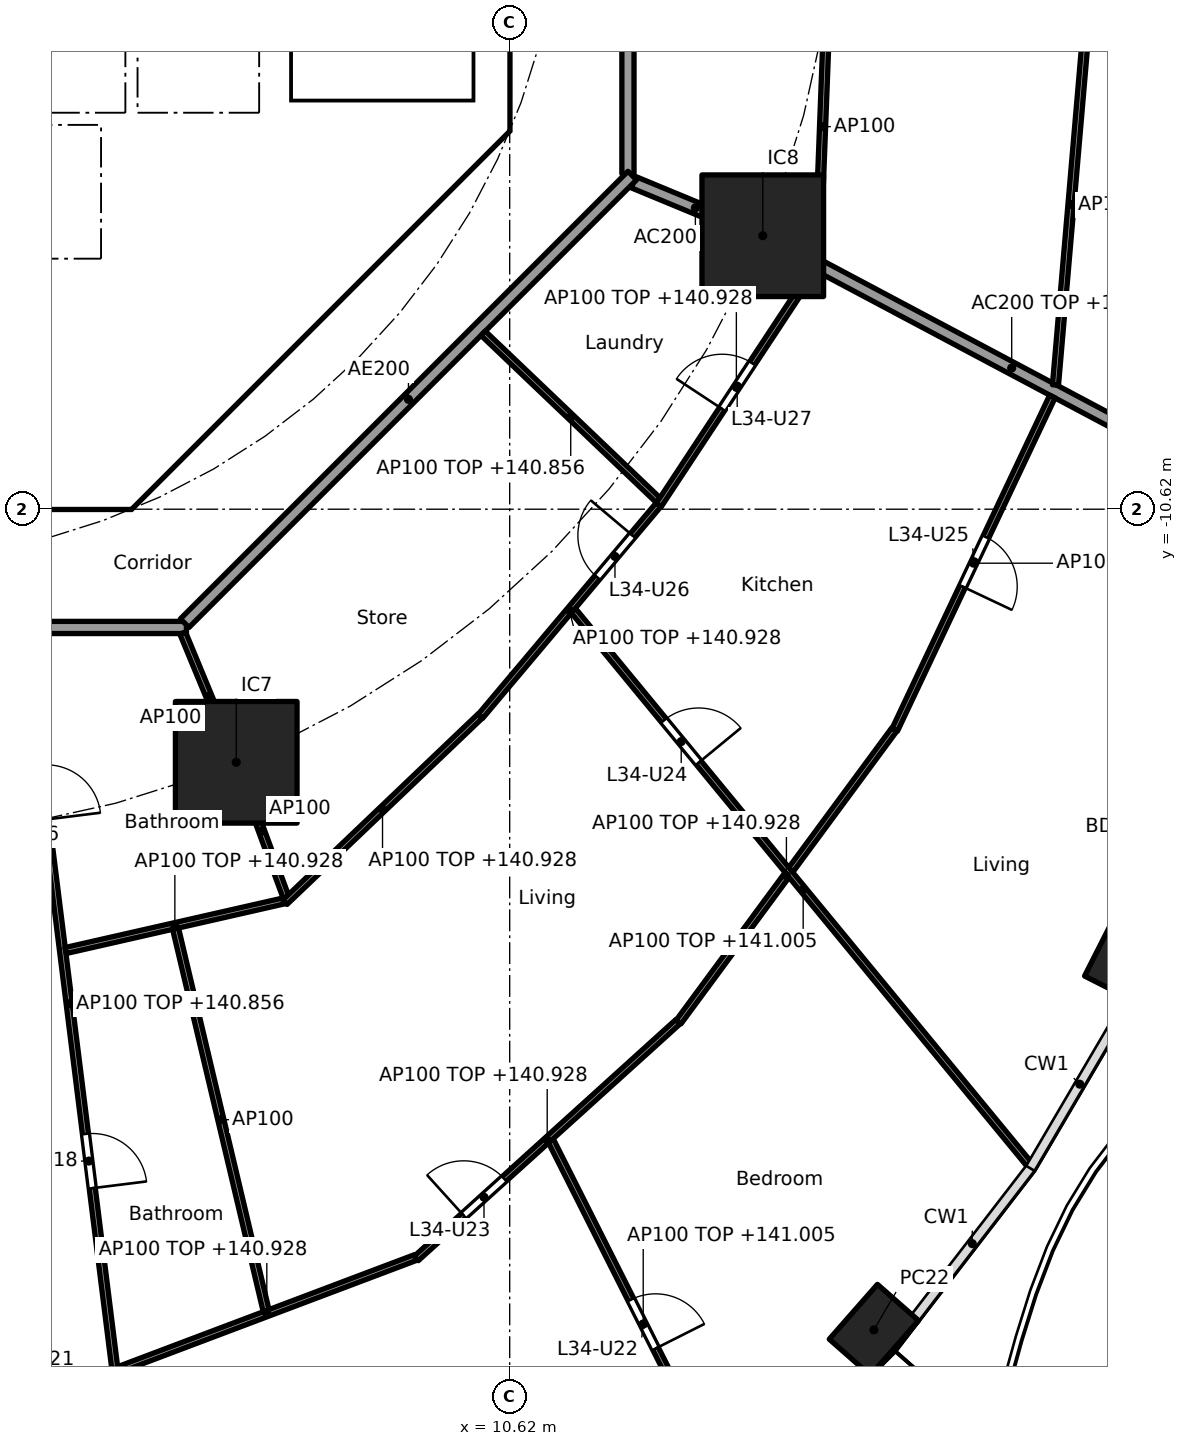
"""IFC4 building model, lengths in metres.
Left out: names, types, materials, properties, quantities, classifications, styles, units other than length and angle.
Written with IfcOpenShell. Run it as: python <this file> out.ifc"""

import sys

from ifc_helpers import new_model, si_unit, direction, frame, frame_2d, origin, origin_2d, place, context, subcontext, project, spatial, polyline, rectangle, hollow_rectangle, outline, extrude, element, fill, save


model = new_model("IFC4")
c1 = context("Model", 3, precision=1e-05, world=origin(), true_north=direction((0.0, 1.0)))
c2 = subcontext(c1, "Body", "Model", "MODEL_VIEW")
j1 = project(units=[si_unit("LENGTHUNIT", "METRE"), si_unit("PLANEANGLEUNIT", "RADIAN")], contexts=[c1])
p1 = place(None, origin())
s1 = spatial("IfcSite", under=j1, at=p1, CompositionType="ELEMENT")
p2 = place(p1, origin())
s2 = spatial("IfcBuilding", under=s1, at=p2, CompositionType="ELEMENT")
p3 = place(p2, frame((0.0, 0.0, 138.1)))
s3 = spatial("IfcBuildingStorey", under=s2, at=p3, CompositionType="ELEMENT", Elevation=138.1)
for number, where, z_axis, x_axis in (
    (1, (16.61, -24.115, 0.0), (0.0, 0.0, 1.0), (0.66, 0.751, 0.0)),
    (2, (20.747, -17.965, 0.0), (0.0, 0.0, 1.0), (0.452, 0.892, 0.0)),
):
    element("IfcColumn", number, at=place(p3, frame(where, z_axis=z_axis, x_axis=x_axis)), inside=s3, PredefinedType="COLUMN", context=c2, shape_type="SweptSolid", body=[
        extrude(hollow_rectangle(XDim=1.2, YDim=0.9, WallThickness=0.04, at=origin_2d()), origin(), (0.0, 0.0, 1.0), 3.7),
    ])
for number, where, z_axis, x_axis in (
    (3, (6.123, -14.782, 0.0), (0.0, 0.0, 1.0), (1.0, 0.0, 0.0)),
    (4, (14.782, -6.123, 0.0), (0.0, 0.0, 1.0), (1.0, 0.0, 0.0)),
):
    element("IfcColumn", number, at=place(p3, frame(where, z_axis=z_axis, x_axis=x_axis)), inside=s3, PredefinedType="COLUMN", context=c2, shape_type="SweptSolid", body=[
        extrude(rectangle(XDim=2.0, YDim=2.0, at=origin_2d()), origin(), (0.0, 0.0, 1.0), 3.7),
    ])
p4 = place(p3, frame((4.613, -9.988, 0.0), z_axis=(0.0, 0.0, 1.0), x_axis=(0.707106781187, 0.707106781187, 0.0)))
e5 = element("IfcWall", 5, at=p4, inside=s3, PredefinedType="SHEAR", context=c2, shape_type="SweptSolid", body=[
    extrude(rectangle(XDim=7.602, YDim=0.6, at=frame_2d((3.801, 0.0))), origin(), (0.0, 0.0, 1.0), 3.44),
])
p5 = place(p4, frame((3.201, 0.0, 0.0)))
e6 = element("IfcOpeningElement", 6, at=p5, cuts=e5, PredefinedType="OPENING", context=c2, shape_type="SweptSolid", body=[
    extrude(rectangle(XDim=1.2, YDim=2.1, at=frame_2d((0.6, 1.05))), frame((0.0, 0.31, 0.0), z_axis=(0.0, -1.0, 0.0), x_axis=(1.0, 0.0, 0.0)), (0.0, 0.0, 1.0), 0.62),
])
p6 = place(p3, frame((4.0, -10.025, 0.0), z_axis=(0.0, 0.0, 1.0), x_axis=(0.0, 1.0, 0.0)))
e7 = element("IfcWall", 7, at=p6, inside=s3, PredefinedType="SOLIDWALL", context=c2, shape_type="SweptSolid", body=[
    extrude(rectangle(XDim=3.0, YDim=0.2, at=frame_2d((1.5, 0.0))), origin(), (0.0, 0.0, 1.0), 3.44),
])
p7 = place(p6, frame((0.975, 0.0, 0.0)))
e8 = element("IfcOpeningElement", 8, at=p7, cuts=e7, PredefinedType="OPENING", context=c2, shape_type="SweptSolid", body=[
    extrude(rectangle(XDim=1.1, YDim=2.1, at=frame_2d((0.55, 1.05))), frame((0.0, 0.11, 0.0), z_axis=(0.0, -1.0, 0.0), x_axis=(1.0, 0.0, 0.0)), (0.0, 0.0, 1.0), 0.22),
])
p8 = place(p3, frame((4.0, -6.5, 0.0), z_axis=(0.0, 0.0, 1.0), x_axis=(0.0, 1.0, 0.0)))
e9 = element("IfcWall", 9, at=p8, inside=s3, PredefinedType="SOLIDWALL", context=c2, shape_type="SweptSolid", body=[
    extrude(rectangle(XDim=2.2, YDim=0.2, at=frame_2d((1.1, 0.0))), origin(), (0.0, 0.0, 1.0), 3.44),
])
p9 = place(p8, frame((0.55, 0.0, 0.0)))
e10 = element("IfcOpeningElement", 10, at=p9, cuts=e9, PredefinedType="OPENING", context=c2, shape_type="SweptSolid", body=[
    extrude(rectangle(XDim=1.1, YDim=2.1, at=frame_2d((0.55, 1.05))), frame((0.0, 0.11, 0.0), z_axis=(0.0, -1.0, 0.0), x_axis=(1.0, 0.0, 0.0)), (0.0, 0.0, 1.0), 0.22),
])
p10 = place(p3, origin())
e11 = element("IfcWall", 11, at=p10, inside=s3, PredefinedType="SHEAR", context=c2, shape_type="SweptSolid", body=[
    extrude(outline(polyline([(-4.152, -10.025), (4.152, -10.025), (4.401, -9.776), (4.825, -10.2), (4.401, -10.625), (-4.401, -10.625), (-4.825, -10.2), (-4.401, -9.776), (-4.152, -10.025)])), origin(), (0.0, 0.0, 1.0), 3.44),
])
p11 = place(p3, origin())
e12 = element("IfcWall", 12, at=p11, inside=s3, PredefinedType="SHEAR", context=c2, shape_type="SweptSolid", body=[
    extrude(outline(polyline([(9.776, -4.401), (10.025, -4.152), (10.025, -3.801), (10.025, 4.152), (9.776, 4.401), (10.2, 4.825), (10.625, 4.401), (10.625, -4.401), (10.2, -4.825), (9.776, -4.401)])), origin(), (0.0, 0.0, 1.0), 3.44),
])
p12 = place(p3, origin())
e13 = element("IfcWall", 13, at=p12, inside=s3, PredefinedType="SOLIDWALL", context=c2, shape_type="SweptSolid", body=[
    extrude(outline(polyline([(-6.7, -2.1), (-6.5, -2.1), (-6.5, -4.1), (-4.5, -4.1), (-4.5, -2.1), (-4.3, -2.1), (-4.3, -4.1), (-2.3, -4.1), (-2.3, -2.1), (-2.1, -2.1), (-2.1, -4.1), (-0.1, -4.1), (-0.1, -2.1), (0.1, -2.1), (0.1, -4.1), (2.1, -4.1), (2.1, -2.1), (2.3, -2.1), (2.3, -4.1), (4.3, -4.1), (4.3, -2.1), (4.5, -2.1), (4.5, -4.1), (6.5, -4.1), (6.5, -2.1), (6.7, -2.1), (6.7, -4.3), (-6.7, -4.3), (-6.7, -2.1)])), origin(), (0.0, 0.0, 1.0), 3.44),
])
p13 = place(p3, origin())
e14 = element("IfcWall", 14, at=p13, inside=s3, PredefinedType="SOLIDWALL", context=c2, shape_type="SweptSolid", body=[
    extrude(outline(polyline([(4.1, -7.025), (-4.1, -7.025), (-4.1, -6.5), (4.1, -6.5), (4.1, -7.025)])), origin(), (0.0, 0.0, 1.0), 3.44),
])
p14 = place(p3, origin())
e15 = element("IfcWall", 15, at=p14, inside=s3, PredefinedType="SOLIDWALL", context=c2, shape_type="SweptSolid", body=[
    extrude(outline(polyline([(7.025, -3.9), (6.7, -3.9), (6.7, 3.9), (7.025, 3.9), (7.025, -3.9)])), origin(), (0.0, 0.0, 1.0), 3.44),
])
p15 = place(p3, origin())
e16 = element("IfcWall", 16, at=p15, inside=s3, PredefinedType="SOLIDWALL", context=c2, shape_type="SweptSolid", body=[
    extrude(outline(polyline([(10.025, -4.1), (6.7, -4.1), (6.7, -3.9), (10.025, -3.9), (10.025, -4.1)])), origin(), (0.0, 0.0, 1.0), 3.44),
])
p16 = place(p3, frame((12.657, -5.243, 0.0), z_axis=(0.0, 0.0, 1.0), x_axis=(0.923846436004, -0.382763324632, 0.0)))
e17 = element("IfcWall", 17, at=p16, inside=s3, PredefinedType="PARTITIONING", context=c2, shape_type="SweptSolid", body=[
    extrude(rectangle(XDim=2.2, YDim=0.2, at=frame_2d((1.1, 0.0))), origin(), (0.0, 0.0, 1.0), 3.44),
])
p17 = place(p3, frame((14.826, -6.146, 0.0), z_axis=(0.0, 0.0, 1.0), x_axis=(0.883012998471, -0.469348532044, 0.0)))
e18 = element("IfcWall", 18, at=p17, inside=s3, PredefinedType="PARTITIONING", context=c2, shape_type="SweptSolid", body=[
    extrude(rectangle(XDim=9.172, YDim=0.2, at=frame_2d((4.586, 0.0))), origin(), (0.0, 0.0, 1.0), 2.828),
])
p18 = place(p3, frame((12.565, -5.104, 0.0), z_axis=(0.0, 0.0, 1.0), x_axis=(0.0, 1.0, 0.0)))
e19 = element("IfcWall", 19, at=p18, inside=s3, PredefinedType="PARTITIONING", context=c2, shape_type="SweptSolid", body=[
    extrude(rectangle(XDim=10.209, YDim=0.2, at=frame_2d((5.104, 0.0))), origin(), (0.0, 0.0, 1.0), 3.44),
])
p19 = place(p3, frame((-5.104, -12.565, 0.0), z_axis=(0.0, 0.0, 1.0), x_axis=(1.0, 0.0, 0.0)))
e20 = element("IfcWall", 20, at=p19, inside=s3, PredefinedType="PARTITIONING", context=c2, shape_type="SweptSolid", body=[
    extrude(rectangle(XDim=10.409, YDim=0.2, at=frame_2d((5.205, 0.0))), origin(), (0.0, 0.0, 1.0), 3.44),
])
p20 = place(p19, frame((5.906, 0.0, 0.0)))
e21 = element("IfcOpeningElement", 21, at=p20, cuts=e20, PredefinedType="OPENING", context=c2, shape_type="SweptSolid", body=[
    extrude(rectangle(XDim=1.0, YDim=2.1, at=frame_2d((0.5, 1.05))), frame((0.0, 0.11, 0.0), z_axis=(0.0, -1.0, 0.0), x_axis=(1.0, 0.0, 0.0)), (0.0, 0.0, 1.0), 0.22),
])
p21 = place(p3, frame((5.275, -12.494, 0.0), z_axis=(0.0, 0.0, 1.0), x_axis=(0.707106781187, 0.707106781187, 0.0)))
e22 = element("IfcWall", 22, at=p21, inside=s3, PredefinedType="PARTITIONING", context=c2, shape_type="SweptSolid", body=[
    extrude(rectangle(XDim=10.409, YDim=0.2, at=frame_2d((5.205, 0.0))), origin(), (0.0, 0.0, 1.0), 3.44),
])
p22 = place(p3, frame((15.849, -2.158, 0.0), z_axis=(0.0, 0.0, 1.0), x_axis=(-0.03838348155, -0.999263082648, 0.0)))
e23 = element("IfcWall", 23, at=p22, inside=s3, PredefinedType="PARTITIONING", context=c2, shape_type="SweptSolid", body=[
    extrude(rectangle(XDim=4.344, YDim=0.1, at=frame_2d((2.172, 0.0))), origin(), (0.0, 0.0, 1.0), 3.44),
])
p23 = place(p3, frame((20.106, -2.642, 0.0), z_axis=(0.0, 0.0, 1.0), x_axis=(-0.085694058383, -0.996321498492, 0.0)))
e24 = element("IfcWall", 24, at=p23, inside=s3, PredefinedType="PARTITIONING", context=c2, shape_type="SweptSolid", body=[
    extrude(rectangle(XDim=5.957, YDim=0.1, at=frame_2d((2.979, 0.0))), origin(), (0.0, 0.0, 1.0), 2.828),
])
p24 = place(p3, frame((2.615, -12.664, 0.0), z_axis=(0.0, 0.0, 1.0), x_axis=(0.124051875784, -0.992275733914, 0.0)))
e25 = element("IfcWall", 25, at=p24, inside=s3, PredefinedType="PARTITIONING", context=c2, shape_type="SweptSolid", body=[
    extrude(rectangle(XDim=12.271, YDim=0.1, at=frame_2d((6.135, 0.0))), origin(), (0.0, 0.0, 1.0), 2.756),
])
p25 = place(p24, frame((2.183, 0.0, 0.0)))
e26 = element("IfcOpeningElement", 26, at=p25, cuts=e25, PredefinedType="OPENING", context=c2, shape_type="SweptSolid", body=[
    extrude(rectangle(XDim=0.9, YDim=2.1, at=frame_2d((0.45, 1.05))), frame((0.0, 0.06, 0.0), z_axis=(0.0, -1.0, 0.0), x_axis=(1.0, 0.0, 0.0)), (0.0, 0.0, 1.0), 0.12),
])
p26 = place(p24, frame((8.293, 0.0, 0.0)))
e27 = element("IfcOpeningElement", 27, at=p26, cuts=e25, PredefinedType="OPENING", context=c2, shape_type="SweptSolid", body=[
    extrude(rectangle(XDim=0.9, YDim=2.1, at=frame_2d((0.45, 1.05))), frame((0.0, 0.06, 0.0), z_axis=(0.0, -1.0, 0.0), x_axis=(1.0, 0.0, 0.0)), (0.0, 0.0, 1.0), 0.12),
])
p27 = place(p3, frame((3.317, -17.878, 0.0), z_axis=(0.0, 0.0, 1.0), x_axis=(0.975099660451, 0.221767112505, 0.0)))
e28 = element("IfcWall", 28, at=p27, inside=s3, PredefinedType="PARTITIONING", context=c2, shape_type="SweptSolid", body=[
    extrude(rectangle(XDim=3.686, YDim=0.1, at=frame_2d((1.843, 0.0))), origin(), (0.0, 0.0, 1.0), 2.828),
])
p28 = place(p3, frame((4.178, -24.773, 0.0), z_axis=(0.0, 0.0, 1.0), x_axis=(0.935585145124, 0.353101169955, 0.0)))
e29 = element("IfcWall", 29, at=p28, inside=s3, PredefinedType="PARTITIONING", context=c2, shape_type="SweptSolid", body=[
    extrude(rectangle(XDim=5.233, YDim=0.1, at=frame_2d((2.617, 0.0))), origin(), (0.0, 0.0, 1.0), 2.828),
])
p29 = place(p3, frame((5.125, -17.518, 0.0), z_axis=(0.0, 0.0, 1.0), x_axis=(0.230621848401, -0.973043453829, 0.0)))
e30 = element("IfcWall", 30, at=p29, inside=s3, PredefinedType="PARTITIONING", context=c2, shape_type="SweptSolid", body=[
    extrude(rectangle(XDim=6.457, YDim=0.1, at=frame_2d((3.228, 0.0))), origin(), (0.0, 0.0, 1.0), 3.44),
])
p30 = place(p3, frame((5.243, -12.657, 0.0), z_axis=(0.0, 0.0, 1.0), x_axis=(0.382703272338, -0.923871314276, 0.0)))
e31 = element("IfcWall", 31, at=p30, inside=s3, PredefinedType="PARTITIONING", context=c2, shape_type="SweptSolid", body=[
    extrude(rectangle(XDim=2.249, YDim=0.1, at=frame_2d((1.125, 0.0))), origin(), (0.0, 0.0, 1.0), 3.44),
])
p31 = place(p3, frame((6.14, -14.829, 0.0), z_axis=(0.0, 0.0, 1.0), x_axis=(0.346198576881, -0.938161257655, 0.0)))
e32 = element("IfcWall", 32, at=p31, inside=s3, PredefinedType="PARTITIONING", context=c2, shape_type="SweptSolid", body=[
    extrude(rectangle(XDim=2.317, YDim=0.1, at=frame_2d((1.158, 0.0))), origin(), (0.0, 0.0, 1.0), 3.44),
])
p32 = place(p3, frame((6.923, -17.084, 0.0), z_axis=(0.0, 0.0, 1.0), x_axis=(0.723719008606, 0.690094773623, 0.0)))
e33 = element("IfcWall", 33, at=p32, inside=s3, PredefinedType="PARTITIONING", context=c2, shape_type="SweptSolid", body=[
    extrude(rectangle(XDim=4.436, YDim=0.1, at=frame_2d((2.218, 0.0))), origin(), (0.0, 0.0, 1.0), 2.828),
])
p33 = place(p3, frame((9.084, -22.941, 0.0), z_axis=(0.0, 0.0, 1.0), x_axis=(0.741684187175, 0.670749257543, 0.0)))
e34 = element("IfcWall", 34, at=p33, inside=s3, PredefinedType="PARTITIONING", context=c2, shape_type="SweptSolid", body=[
    extrude(rectangle(XDim=5.806, YDim=0.1, at=frame_2d((2.903, 0.0))), origin(), (0.0, 0.0, 1.0), 2.828),
])
p34 = place(p33, frame((1.052, 0.0, 0.0)))
e35 = element("IfcOpeningElement", 35, at=p34, cuts=e34, PredefinedType="OPENING", context=c2, shape_type="SweptSolid", body=[
    extrude(rectangle(XDim=0.9, YDim=2.1, at=frame_2d((0.45, 1.05))), frame((0.0, 0.06, 0.0), z_axis=(0.0, -1.0, 0.0), x_axis=(1.0, 0.0, 0.0)), (0.0, 0.0, 1.0), 0.12),
])
p35 = place(p3, frame((11.296, -21.005, 0.0), z_axis=(0.0, 0.0, 1.0), x_axis=(0.44991509116, -0.893071335755, 0.0)))
e36 = element("IfcWall", 36, at=p35, inside=s3, PredefinedType="PARTITIONING", context=c2, shape_type="SweptSolid", body=[
    extrude(rectangle(XDim=6.755, YDim=0.1, at=frame_2d((3.377, 0.0))), origin(), (0.0, 0.0, 1.0), 2.905),
])
p36 = place(p35, frame((2.927, 0.0, 0.0)))
e37 = element("IfcOpeningElement", 37, at=p36, cuts=e36, PredefinedType="OPENING", context=c2, shape_type="SweptSolid", body=[
    extrude(rectangle(XDim=0.9, YDim=2.1, at=frame_2d((0.45, 1.05))), frame((0.0, 0.06, 0.0), z_axis=(0.0, -1.0, 0.0), x_axis=(1.0, 0.0, 0.0)), (0.0, 0.0, 1.0), 0.12),
])
p37 = place(p3, frame((10.138, -14.026, 0.0), z_axis=(0.0, 0.0, 1.0), x_axis=(0.644051444483, 0.764982180746, 0.0)))
e38 = element("IfcWall", 38, at=p37, inside=s3, PredefinedType="PARTITIONING", context=c2, shape_type="SweptSolid", body=[
    extrude(rectangle(XDim=4.548, YDim=0.1, at=frame_2d((2.274, 0.0))), origin(), (0.0, 0.0, 1.0), 2.828),
])
p38 = place(p37, frame((2.986, 0.0, 0.0)))
e39 = element("IfcOpeningElement", 39, at=p38, cuts=e38, PredefinedType="OPENING", context=c2, shape_type="SweptSolid", body=[
    extrude(rectangle(XDim=0.9, YDim=2.1, at=frame_2d((0.45, 1.05))), frame((0.0, 0.06, 0.0), z_axis=(0.0, -1.0, 0.0), x_axis=(1.0, 0.0, 0.0)), (0.0, 0.0, 1.0), 0.12),
])
p39 = place(p3, frame((13.397, -19.053, 0.0), z_axis=(0.0, 0.0, 1.0), x_axis=(0.593522299069, 0.804817544856, 0.0)))
e40 = element("IfcWall", 40, at=p39, inside=s3, PredefinedType="PARTITIONING", context=c2, shape_type="SweptSolid", body=[
    extrude(rectangle(XDim=5.976, YDim=0.1, at=frame_2d((2.988, 0.0))), origin(), (0.0, 0.0, 1.0), 2.828),
])
p40 = place(p3, frame((11.667, -12.287, 0.0), z_axis=(0.0, 0.0, 1.0), x_axis=(0.635618027424, -0.772003706736, 0.0)))
e41 = element("IfcWall", 41, at=p40, inside=s3, PredefinedType="PARTITIONING", context=c2, shape_type="SweptSolid", body=[
    extrude(rectangle(XDim=11.893, YDim=0.1, at=frame_2d((5.947, 0.0))), origin(), (0.0, 0.0, 1.0), 2.905),
])
p41 = place(p40, frame((2.341, 0.0, 0.0)))
e42 = element("IfcOpeningElement", 42, at=p41, cuts=e41, PredefinedType="OPENING", context=c2, shape_type="SweptSolid", body=[
    extrude(rectangle(XDim=0.9, YDim=2.1, at=frame_2d((0.45, 1.05))), frame((0.0, 0.06, 0.0), z_axis=(0.0, -1.0, 0.0), x_axis=(1.0, 0.0, 0.0)), (0.0, 0.0, 1.0), 0.12),
])
p42 = place(p3, frame((10.184, -7.727, 0.0), z_axis=(0.0, 0.0, 1.0), x_axis=(0.723654892782, -0.690162007179, 0.0)))
e43 = element("IfcWall", 43, at=p42, inside=s3, PredefinedType="PARTITIONING", context=c2, shape_type="SweptSolid", body=[
    extrude(rectangle(XDim=3.98, YDim=0.1, at=frame_2d((1.99, 0.0))), origin(), (0.0, 0.0, 1.0), 2.756),
])
p43 = place(p3, frame((13.072, -10.55, 0.0), z_axis=(0.0, 0.0, 1.0), x_axis=(0.550607247415, 0.834764433295, 0.0)))
e44 = element("IfcWall", 44, at=p43, inside=s3, PredefinedType="PARTITIONING", context=c2, shape_type="SweptSolid", body=[
    extrude(rectangle(XDim=4.633, YDim=0.1, at=frame_2d((2.316, 0.0))), origin(), (0.0, 0.0, 1.0), 2.828),
])
p44 = place(p43, frame((1.891, 0.0, 0.0)))
e45 = element("IfcOpeningElement", 45, at=p44, cuts=e44, PredefinedType="OPENING", context=c2, shape_type="SweptSolid", body=[
    extrude(rectangle(XDim=0.9, YDim=2.1, at=frame_2d((0.45, 1.05))), frame((0.0, 0.06, 0.0), z_axis=(0.0, -1.0, 0.0), x_axis=(1.0, 0.0, 0.0)), (0.0, 0.0, 1.0), 0.12),
])
p45 = place(p3, frame((16.953, -14.249, 0.0), z_axis=(0.0, 0.0, 1.0), x_axis=(0.427438858397, 0.904044259056, 0.0)))
e46 = element("IfcWall", 46, at=p45, inside=s3, PredefinedType="PARTITIONING", context=c2, shape_type="SweptSolid", body=[
    extrude(rectangle(XDim=6.063, YDim=0.1, at=frame_2d((3.031, 0.0))), origin(), (0.0, 0.0, 1.0), 2.828),
])
p46 = place(p45, frame((2.607, 0.0, 0.0)))
e47 = element("IfcOpeningElement", 47, at=p46, cuts=e46, PredefinedType="OPENING", context=c2, shape_type="SweptSolid", body=[
    extrude(rectangle(XDim=0.9, YDim=2.1, at=frame_2d((0.45, 1.05))), frame((0.0, 0.06, 0.0), z_axis=(0.0, -1.0, 0.0), x_axis=(1.0, 0.0, 0.0)), (0.0, 0.0, 1.0), 0.12),
])
p47 = place(p9, origin())
e48 = element("IfcDoor", 48, at=p47, inside=s3, OperationType="DOUBLE_DOOR_SLIDING", PredefinedType="DOOR", context=c2, shape_type="SweptSolid", body=[
    extrude(rectangle(XDim=1.1, YDim=2.1, at=frame_2d((0.55, 1.05))), frame((0.0, 0.025, 0.0), z_axis=(0.0, -1.0, 0.0), x_axis=(1.0, 0.0, 0.0)), (0.0, 0.0, 1.0), 0.05),
])
fill(e10, e48)
p48 = place(p7, origin())
e49 = element("IfcDoor", 49, at=p48, inside=s3, OperationType="SINGLE_SWING_LEFT", PredefinedType="DOOR", context=c2, shape_type="SweptSolid", body=[
    extrude(rectangle(XDim=1.1, YDim=2.1, at=frame_2d((0.55, 1.05))), frame((0.0, 0.025, 0.0), z_axis=(0.0, -1.0, 0.0), x_axis=(1.0, 0.0, 0.0)), (0.0, 0.0, 1.0), 0.05),
])
fill(e8, e49)
p49 = place(p5, origin())
e50 = element("IfcDoor", 50, at=p49, inside=s3, OperationType="SINGLE_SWING_RIGHT", PredefinedType="DOOR", context=c2, shape_type="SweptSolid", body=[
    extrude(rectangle(XDim=1.2, YDim=2.1, at=frame_2d((0.6, 1.05))), frame((0.0, 0.025, 0.0), z_axis=(0.0, -1.0, 0.0), x_axis=(1.0, 0.0, 0.0)), (0.0, 0.0, 1.0), 0.05),
])
fill(e6, e50)
p50 = place(p26, origin())
e51 = element("IfcDoor", 51, at=p50, inside=s3, OperationType="SINGLE_SWING_RIGHT", PredefinedType="DOOR", context=c2, shape_type="SweptSolid", body=[
    extrude(rectangle(XDim=0.9, YDim=2.1, at=frame_2d((0.45, 1.05))), frame((0.0, 0.025, 0.0), z_axis=(0.0, -1.0, 0.0), x_axis=(1.0, 0.0, 0.0)), (0.0, 0.0, 1.0), 0.05),
])
fill(e27, e51)
p51 = place(p36, origin())
e52 = element("IfcDoor", 52, at=p51, inside=s3, OperationType="SINGLE_SWING_RIGHT", PredefinedType="DOOR", context=c2, shape_type="SweptSolid", body=[
    extrude(rectangle(XDim=0.9, YDim=2.1, at=frame_2d((0.45, 1.05))), frame((0.0, 0.025, 0.0), z_axis=(0.0, -1.0, 0.0), x_axis=(1.0, 0.0, 0.0)), (0.0, 0.0, 1.0), 0.05),
])
fill(e37, e52)
p52 = place(p34, origin())
e53 = element("IfcDoor", 53, at=p52, inside=s3, OperationType="SINGLE_SWING_LEFT", PredefinedType="DOOR", context=c2, shape_type="SweptSolid", body=[
    extrude(rectangle(XDim=0.9, YDim=2.1, at=frame_2d((0.45, 1.05))), frame((0.0, 0.025, 0.0), z_axis=(0.0, -1.0, 0.0), x_axis=(1.0, 0.0, 0.0)), (0.0, 0.0, 1.0), 0.05),
])
fill(e35, e53)
p53 = place(p41, origin())
e54 = element("IfcDoor", 54, at=p53, inside=s3, OperationType="SINGLE_SWING_RIGHT", PredefinedType="DOOR", context=c2, shape_type="SweptSolid", body=[
    extrude(rectangle(XDim=0.9, YDim=2.1, at=frame_2d((0.45, 1.05))), frame((0.0, 0.025, 0.0), z_axis=(0.0, -1.0, 0.0), x_axis=(1.0, 0.0, 0.0)), (0.0, 0.0, 1.0), 0.05),
])
fill(e42, e54)
p54 = place(p46, frame((0.9, 0.0, 0.0), x_axis=(-1.0, 0.0, 0.0)))
e55 = element("IfcDoor", 55, at=p54, inside=s3, OperationType="SINGLE_SWING_RIGHT", PredefinedType="DOOR", context=c2, shape_type="SweptSolid", body=[
    extrude(rectangle(XDim=0.9, YDim=2.1, at=frame_2d((0.45, 1.05))), frame((0.0, 0.025, 0.0), z_axis=(0.0, -1.0, 0.0), x_axis=(1.0, 0.0, 0.0)), (0.0, 0.0, 1.0), 0.05),
])
fill(e47, e55)
p55 = place(p38, origin())
e56 = element("IfcDoor", 56, at=p55, inside=s3, OperationType="SINGLE_SWING_RIGHT", PredefinedType="DOOR", context=c2, shape_type="SweptSolid", body=[
    extrude(rectangle(XDim=0.9, YDim=2.1, at=frame_2d((0.45, 1.05))), frame((0.0, 0.025, 0.0), z_axis=(0.0, -1.0, 0.0), x_axis=(1.0, 0.0, 0.0)), (0.0, 0.0, 1.0), 0.05),
])
fill(e39, e56)
p56 = place(p44, origin())
e57 = element("IfcDoor", 57, at=p56, inside=s3, OperationType="SINGLE_SWING_LEFT", PredefinedType="DOOR", context=c2, shape_type="SweptSolid", body=[
    extrude(rectangle(XDim=0.9, YDim=2.1, at=frame_2d((0.45, 1.05))), frame((0.0, 0.025, 0.0), z_axis=(0.0, -1.0, 0.0), x_axis=(1.0, 0.0, 0.0)), (0.0, 0.0, 1.0), 0.05),
])
fill(e45, e57)
save(model, sys.argv[1])
